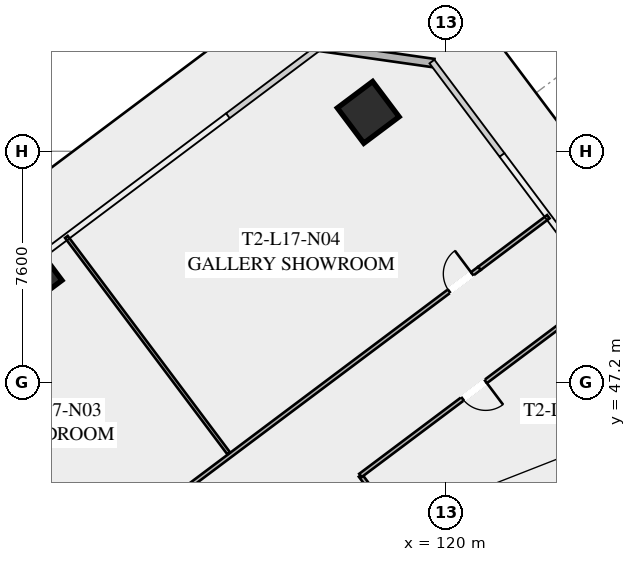
"""IFC4 building model, lengths in metres.
Left out: names, types, materials, properties, quantities, classifications, styles, units other than length and angle.
Written with IfcOpenShell. Run it as: python <this file> out.ifc"""

import sys

from ifc_helpers import new_model, si_unit, direction, frame, frame_2d, origin, origin_2d, place, context, subcontext, project, spatial, rectangle, hollow_rectangle, extrude, element, fill, save


model = new_model("IFC4")
c1 = context("Model", 3, precision=1e-05, world=origin(), true_north=direction((0.0, 1.0)))
c2 = subcontext(c1, "Body", "Model", "MODEL_VIEW")
j1 = project(units=[si_unit("LENGTHUNIT", "METRE"), si_unit("PLANEANGLEUNIT", "RADIAN")], contexts=[c1])
p1 = place(None, origin())
s1 = spatial("IfcSite", under=j1, at=p1, CompositionType="ELEMENT")
p2 = place(p1, origin())
s2 = spatial("IfcBuilding", under=s1, at=p2, CompositionType="ELEMENT")
p3 = place(p2, frame((0.0, 0.0, 67.2)))
s3 = spatial("IfcBuildingStorey", under=s2, at=p3, CompositionType="ELEMENT", Elevation=67.2)
p4 = place(p3, frame((117.44, 56.08, -0.195), z_axis=(0.0, 0.0, 1.0), x_axis=(0.799999996291, 0.600000004945, 0.0)))
e1 = element("IfcColumn", 1, at=p4, inside=s3, PredefinedType="COLUMN", context=c2, shape_type="SweptSolid", body=[
    extrude(hollow_rectangle(XDim=1.45, YDim=1.45, WallThickness=0.055, at=origin_2d()), origin(), (0.0, 0.0, 1.0), 3.545),
])
p5 = place(p3, frame((106.77, 50.64, -0.195), z_axis=(0.0, 0.0, 1.0), x_axis=(0.799999996291, 0.600000004945, 0.0)))
e2 = element("IfcColumn", 2, at=p5, inside=s3, PredefinedType="COLUMN", context=c2, shape_type="SweptSolid", body=[
    extrude(hollow_rectangle(XDim=0.85, YDim=0.85, WallThickness=0.035, at=origin_2d()), origin(), (0.0, 0.0, 1.0), 3.545),
])
p6 = place(p3, frame((115.82, 58.24, 0.0), z_axis=(0.0, 0.0, 1.0), x_axis=(0.989948214866, -0.141430307517, 0.0)))
e3 = element("IfcWall", 3, at=p6, inside=s3, PredefinedType="SOLIDWALL", context=c2, shape_type="SweptSolid", body=[
    extrude(rectangle(XDim=3.818, YDim=0.28, at=frame_2d((1.909, 0.0))), origin(), (0.0, 0.0, 1.0), 3.35),
])
p7 = place(p3, frame((119.824, 40.618, 0.0), z_axis=(0.0, 0.0, 1.0), x_axis=(-0.599982243973, 0.800013316712, 0.0)))
e4 = element("IfcWall", 4, at=p7, inside=s3, PredefinedType="PARTITIONING", context=c2, shape_type="SweptSolid", body=[
    extrude(rectangle(XDim=4.4, YDim=0.135, at=frame_2d((2.2, 0.0))), origin(), (0.0, 0.0, 1.0), 2.703),
])
p8 = place(p3, frame((98.516, 34.012, 0.0), z_axis=(0.0, 0.0, 1.0), x_axis=(0.8, 0.6, 0.0)))
e5 = element("IfcWall", 5, at=p8, inside=s3, PredefinedType="PARTITIONING", context=c2, shape_type="SweptSolid", body=[
    extrude(rectangle(XDim=28.23, YDim=0.135, at=frame_2d((14.115, 0.0))), origin(), (0.0, 0.0, 1.0), 2.703),
])
p9 = place(p8, frame((0.3, 0.0, 0.0)))
e6 = element("IfcOpeningElement", 6, at=p9, cuts=e5, PredefinedType="OPENING", context=c2, shape_type="SweptSolid", body=[
    extrude(rectangle(XDim=0.95, YDim=2.05, at=frame_2d((0.475, 1.025))), frame((0.0, 0.077, 0.0), z_axis=(0.0, -1.0, 0.0), x_axis=(1.0, 0.0, 0.0)), (0.0, 0.0, 1.0), 0.155),
])
p10 = place(p8, frame((6.84, 0.0, 0.0)))
e7 = element("IfcOpeningElement", 7, at=p10, cuts=e5, PredefinedType="OPENING", context=c2, shape_type="SweptSolid", body=[
    extrude(rectangle(XDim=0.95, YDim=2.05, at=frame_2d((0.475, 1.025))), frame((0.0, 0.077, 0.0), z_axis=(0.0, -1.0, 0.0), x_axis=(1.0, 0.0, 0.0)), (0.0, 0.0, 1.0), 0.155),
])
p11 = place(p8, frame((10.863, 0.0, 0.0)))
e8 = element("IfcOpeningElement", 8, at=p11, cuts=e5, PredefinedType="OPENING", context=c2, shape_type="SweptSolid", body=[
    extrude(rectangle(XDim=0.95, YDim=2.05, at=frame_2d((0.475, 1.025))), frame((0.0, 0.077, 0.0), z_axis=(0.0, -1.0, 0.0), x_axis=(1.0, 0.0, 0.0)), (0.0, 0.0, 1.0), 0.155),
])
p12 = place(p8, frame((26.98, 0.0, 0.0)))
e9 = element("IfcOpeningElement", 9, at=p12, cuts=e5, PredefinedType="OPENING", context=c2, shape_type="SweptSolid", body=[
    extrude(rectangle(XDim=0.95, YDim=2.05, at=frame_2d((0.475, 1.025))), frame((0.0, 0.077, 0.0), z_axis=(0.0, -1.0, 0.0), x_axis=(1.0, 0.0, 0.0)), (0.0, 0.0, 1.0), 0.155),
])
p13 = place(p3, frame((121.1, 50.95, 0.0), z_axis=(0.0, 0.0, 1.0), x_axis=(0.799989647378, 0.600013803248, 0.0)))
e10 = element("IfcWall", 10, at=p13, inside=s3, PredefinedType="PARTITIONING", context=c2, shape_type="SweptSolid", body=[
    extrude(rectangle(XDim=2.83, YDim=0.135, at=frame_2d((1.415, 0.0))), origin(), (0.0, 0.0, 1.0), 2.703),
])
p14 = place(p3, frame((112.852, 44.864, 0.0), z_axis=(0.0, 0.0, 1.0), x_axis=(-0.600013167126, 0.799990124486, 0.0)))
e11 = element("IfcWall", 11, at=p14, inside=s3, PredefinedType="PARTITIONING", context=c2, shape_type="SweptSolid", body=[
    extrude(rectangle(XDim=8.9, YDim=0.11, at=frame_2d((4.45, 0.0))), origin(), (0.0, 0.0, 1.0), 2.703),
])
p15 = place(p3, frame((125.224, 50.168, 0.0), z_axis=(0.0, 0.0, 1.0), x_axis=(-0.8, -0.6, 0.0)))
e12 = element("IfcWall", 12, at=p15, inside=s3, PredefinedType="PARTITIONING", context=c2, shape_type="SweptSolid", body=[
    extrude(rectangle(XDim=10.05, YDim=0.135, at=frame_2d((5.025, 0.0))), origin(), (0.0, 0.0, 1.0), 2.703),
])
p16 = place(p15, frame((4.9, 0.0, 0.0)))
e13 = element("IfcOpeningElement", 13, at=p16, cuts=e12, PredefinedType="OPENING", context=c2, shape_type="SweptSolid", body=[
    extrude(rectangle(XDim=0.95, YDim=2.05, at=frame_2d((0.475, 1.025))), frame((0.0, 0.077, 0.0), z_axis=(0.0, -1.0, 0.0), x_axis=(1.0, 0.0, 0.0)), (0.0, 0.0, 1.0), 0.155),
])
p17 = place(p3, frame((127.864, 46.648, 0.0), z_axis=(0.0, 0.0, 1.0), x_axis=(-0.800007145523, -0.599990472518, 0.0)))
e14 = element("IfcWall", 14, at=p17, inside=s3, PredefinedType="PARTITIONING", context=c2, shape_type="SweptSolid", body=[
    extrude(rectangle(XDim=8.2, YDim=0.11, at=frame_2d((4.1, 0.0))), origin(), (0.0, 0.0, 1.0), 2.703),
])
p18 = place(p12, origin())
e15 = element("IfcDoor", 15, at=p18, inside=s3, OperationType="SINGLE_SWING_RIGHT", PredefinedType="DOOR", context=c2, shape_type="SweptSolid", body=[
    extrude(rectangle(XDim=0.95, YDim=2.05, at=frame_2d((0.475, 1.025))), frame((0.0, 0.025, 0.0), z_axis=(0.0, -1.0, 0.0), x_axis=(1.0, 0.0, 0.0)), (0.0, 0.0, 1.0), 0.05),
])
fill(e9, e15)
p19 = place(p16, origin())
e16 = element("IfcDoor", 16, at=p19, inside=s3, OperationType="SINGLE_SWING_LEFT", PredefinedType="DOOR", context=c2, shape_type="SweptSolid", body=[
    extrude(rectangle(XDim=0.95, YDim=2.05, at=frame_2d((0.475, 1.025))), frame((0.0, 0.025, 0.0), z_axis=(0.0, -1.0, 0.0), x_axis=(1.0, 0.0, 0.0)), (0.0, 0.0, 1.0), 0.05),
])
fill(e13, e16)
save(model, sys.argv[1])
